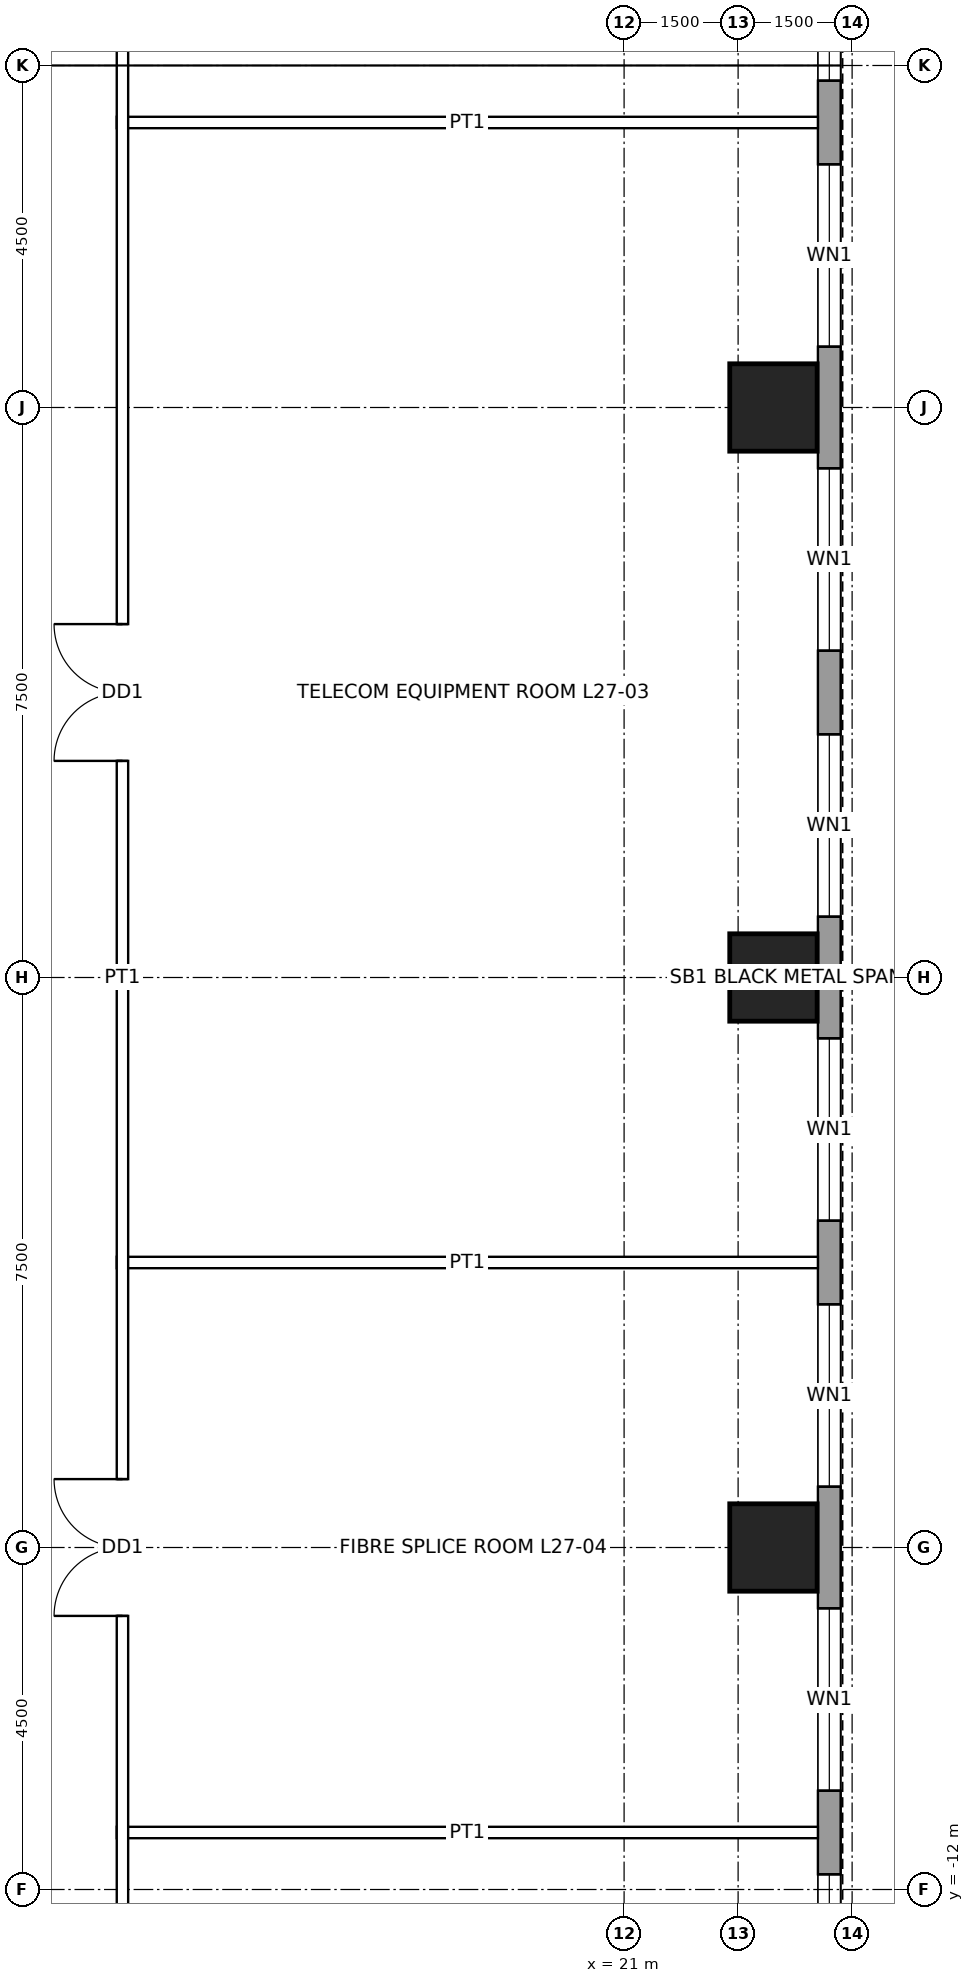
"""IFC4 building model, lengths in metres.
Left out: names, types, materials, properties, quantities, classifications, styles, units other than length and angle.
Written with IfcOpenShell. Run it as: python <this file> out.ifc"""

import sys

from ifc_helpers import new_model, si_unit, direction, frame, frame_2d, origin, origin_2d, place, context, subcontext, project, spatial, rectangle, hollow_rectangle, extrude, element, fill, save


model = new_model("IFC4")
c1 = context("Model", 3, precision=1e-05, world=origin(), true_north=direction((0.0, 1.0)))
c2 = subcontext(c1, "Body", "Model", "MODEL_VIEW")
j1 = project(units=[si_unit("LENGTHUNIT", "METRE"), si_unit("PLANEANGLEUNIT", "RADIAN")], contexts=[c1])
p1 = place(None, origin())
s1 = spatial("IfcSite", under=j1, at=p1, CompositionType="ELEMENT")
p2 = place(p1, origin())
s2 = spatial("IfcBuilding", under=s1, at=p2, CompositionType="ELEMENT")
p3 = place(p2, frame((0.0, 0.0, 135.9)))
s3 = spatial("IfcBuildingStorey", under=s2, at=p3, CompositionType="ELEMENT", Elevation=135.9)
for number, where, z_axis, x_axis in (
    (1, (22.965, 7.5, 0.0), (0.0, 0.0, 1.0), (1.0, 0.0, 0.0)),
    (2, (22.965, 0.0, 0.0), (0.0, 0.0, 1.0), (1.0, 0.0, 0.0)),
    (3, (22.965, -7.5, 0.0), (0.0, 0.0, 1.0), (1.0, 0.0, 0.0)),
):
    element("IfcColumn", number, at=place(p3, frame(where, z_axis=z_axis, x_axis=x_axis)), inside=s3, PredefinedType="COLUMN", context=c2, shape_type="SweptSolid", body=[
        extrude(hollow_rectangle(XDim=1.15, YDim=1.15, WallThickness=0.075, at=origin_2d()), origin(), (0.0, 0.0, 1.0), 4.5),
    ])
p4 = place(p3, frame((23.7, 16.2, 0.0), z_axis=(0.0, 0.0, 1.0), x_axis=(0.0, -1.0, 0.0)))
e4 = element("IfcWall", 4, at=p4, inside=s3, PredefinedType="SOLIDWALL", context=c2, shape_type="SweptSolid", body=[
    extrude(rectangle(XDim=32.4, YDim=0.3, at=frame_2d((16.2, 0.0))), origin(), (0.0, 0.0, 1.0), 4.3),
])
p5 = place(p4, frame((2.0, 0.0, 1.0)))
e5 = element("IfcOpeningElement", 5, at=p5, cuts=e4, PredefinedType="OPENING", context=c2, shape_type="SweptSolid", body=[
    extrude(rectangle(XDim=2.4, YDim=1.2, at=frame_2d((1.2, 0.6))), frame((0.0, 0.16, 0.0), z_axis=(0.0, -1.0, 0.0), x_axis=(1.0, 0.0, 0.0)), (0.0, 0.0, 1.0), 0.32),
])
p6 = place(p4, frame((5.5, 0.0, 1.0)))
e6 = element("IfcOpeningElement", 6, at=p6, cuts=e4, PredefinedType="OPENING", context=c2, shape_type="SweptSolid", body=[
    extrude(rectangle(XDim=2.4, YDim=1.2, at=frame_2d((1.2, 0.6))), frame((0.0, 0.16, 0.0), z_axis=(0.0, -1.0, 0.0), x_axis=(1.0, 0.0, 0.0)), (0.0, 0.0, 1.0), 0.32),
])
p7 = place(p4, frame((9.5, 0.0, 1.0)))
e7 = element("IfcOpeningElement", 7, at=p7, cuts=e4, PredefinedType="OPENING", context=c2, shape_type="SweptSolid", body=[
    extrude(rectangle(XDim=2.4, YDim=1.2, at=frame_2d((1.2, 0.6))), frame((0.0, 0.16, 0.0), z_axis=(0.0, -1.0, 0.0), x_axis=(1.0, 0.0, 0.0)), (0.0, 0.0, 1.0), 0.32),
])
p8 = place(p4, frame((13.0, 0.0, 1.0)))
e8 = element("IfcOpeningElement", 8, at=p8, cuts=e4, PredefinedType="OPENING", context=c2, shape_type="SweptSolid", body=[
    extrude(rectangle(XDim=2.4, YDim=1.2, at=frame_2d((1.2, 0.6))), frame((0.0, 0.16, 0.0), z_axis=(0.0, -1.0, 0.0), x_axis=(1.0, 0.0, 0.0)), (0.0, 0.0, 1.0), 0.32),
])
p9 = place(p4, frame((17.0, 0.0, 1.0)))
e9 = element("IfcOpeningElement", 9, at=p9, cuts=e4, PredefinedType="OPENING", context=c2, shape_type="SweptSolid", body=[
    extrude(rectangle(XDim=2.4, YDim=1.2, at=frame_2d((1.2, 0.6))), frame((0.0, 0.16, 0.0), z_axis=(0.0, -1.0, 0.0), x_axis=(1.0, 0.0, 0.0)), (0.0, 0.0, 1.0), 0.32),
])
p10 = place(p4, frame((20.5, 0.0, 1.0)))
e10 = element("IfcOpeningElement", 10, at=p10, cuts=e4, PredefinedType="OPENING", context=c2, shape_type="SweptSolid", body=[
    extrude(rectangle(XDim=2.4, YDim=1.2, at=frame_2d((1.2, 0.6))), frame((0.0, 0.16, 0.0), z_axis=(0.0, -1.0, 0.0), x_axis=(1.0, 0.0, 0.0)), (0.0, 0.0, 1.0), 0.32),
])
p11 = place(p4, frame((24.5, 0.0, 1.0)))
e11 = element("IfcOpeningElement", 11, at=p11, cuts=e4, PredefinedType="OPENING", context=c2, shape_type="SweptSolid", body=[
    extrude(rectangle(XDim=2.4, YDim=1.2, at=frame_2d((1.2, 0.6))), frame((0.0, 0.16, 0.0), z_axis=(0.0, -1.0, 0.0), x_axis=(1.0, 0.0, 0.0)), (0.0, 0.0, 1.0), 0.32),
])
p12 = place(p4, frame((28.0, 0.0, 1.0)))
e12 = element("IfcOpeningElement", 12, at=p12, cuts=e4, PredefinedType="OPENING", context=c2, shape_type="SweptSolid", body=[
    extrude(rectangle(XDim=2.4, YDim=1.2, at=frame_2d((1.2, 0.6))), frame((0.0, 0.16, 0.0), z_axis=(0.0, -1.0, 0.0), x_axis=(1.0, 0.0, 0.0)), (0.0, 0.0, 1.0), 0.32),
])
for number, where, z_axis, x_axis in (
    (13, (14.325, -11.25, 0.0), (0.0, 0.0, 1.0), (1.0, 0.0, 0.0)),
    (14, (14.325, -3.75, 0.0), (0.0, 0.0, 1.0), (1.0, 0.0, 0.0)),
    (15, (14.325, 11.25, 0.0), (0.0, 0.0, 1.0), (1.0, 0.0, 0.0)),
):
    element("IfcWall", number, at=place(p3, frame(where, z_axis=z_axis, x_axis=x_axis)), inside=s3, PredefinedType="PARTITIONING", context=c2, shape_type="SweptSolid", body=[
        extrude(rectangle(XDim=9.225, YDim=0.15, at=frame_2d((4.613, 0.0))), origin(), (0.0, 0.0, 1.0), 3.431),
    ])
p13 = place(p3, frame((14.4, -14.475, 0.0), z_axis=(0.0, 0.0, 1.0), x_axis=(0.0, 1.0, 0.0)))
e16 = element("IfcWall", 16, at=p13, inside=s3, PredefinedType="PARTITIONING", context=c2, shape_type="SweptSolid", body=[
    extrude(rectangle(XDim=28.95, YDim=0.15, at=frame_2d((14.475, 0.0))), origin(), (0.0, 0.0, 1.0), 4.3),
])
p14 = place(p13, frame((17.325, 0.0, 0.0)))
e17 = element("IfcOpeningElement", 17, at=p14, cuts=e16, PredefinedType="OPENING", context=c2, shape_type="SweptSolid", body=[
    extrude(rectangle(XDim=1.8, YDim=2.4, at=frame_2d((0.9, 1.2))), frame((0.0, 0.085, 0.0), z_axis=(0.0, -1.0, 0.0), x_axis=(1.0, 0.0, 0.0)), (0.0, 0.0, 1.0), 0.17),
])
p15 = place(p13, frame((6.075, 0.0, 0.0)))
e18 = element("IfcOpeningElement", 18, at=p15, cuts=e16, PredefinedType="OPENING", context=c2, shape_type="SweptSolid", body=[
    extrude(rectangle(XDim=1.8, YDim=2.4, at=frame_2d((0.9, 1.2))), frame((0.0, 0.085, 0.0), z_axis=(0.0, -1.0, 0.0), x_axis=(1.0, 0.0, 0.0)), (0.0, 0.0, 1.0), 0.17),
])
p16 = place(p5, origin())
e19 = element("IfcWindow", 19, at=p16, inside=s3, PartitioningType="SINGLE_PANEL", PredefinedType="WINDOW", context=c2, shape_type="SweptSolid", body=[
    extrude(rectangle(XDim=2.4, YDim=1.2, at=frame_2d((1.2, 0.6))), frame((0.0, 0.03, 0.0), z_axis=(0.0, -1.0, 0.0), x_axis=(1.0, 0.0, 0.0)), (0.0, 0.0, 1.0), 0.06),
])
fill(e5, e19)
p17 = place(p6, origin())
e20 = element("IfcWindow", 20, at=p17, inside=s3, PartitioningType="SINGLE_PANEL", PredefinedType="WINDOW", context=c2, shape_type="SweptSolid", body=[
    extrude(rectangle(XDim=2.4, YDim=1.2, at=frame_2d((1.2, 0.6))), frame((0.0, 0.03, 0.0), z_axis=(0.0, -1.0, 0.0), x_axis=(1.0, 0.0, 0.0)), (0.0, 0.0, 1.0), 0.06),
])
fill(e6, e20)
p18 = place(p7, origin())
e21 = element("IfcWindow", 21, at=p18, inside=s3, PartitioningType="SINGLE_PANEL", PredefinedType="WINDOW", context=c2, shape_type="SweptSolid", body=[
    extrude(rectangle(XDim=2.4, YDim=1.2, at=frame_2d((1.2, 0.6))), frame((0.0, 0.03, 0.0), z_axis=(0.0, -1.0, 0.0), x_axis=(1.0, 0.0, 0.0)), (0.0, 0.0, 1.0), 0.06),
])
fill(e7, e21)
p19 = place(p8, origin())
e22 = element("IfcWindow", 22, at=p19, inside=s3, PartitioningType="SINGLE_PANEL", PredefinedType="WINDOW", context=c2, shape_type="SweptSolid", body=[
    extrude(rectangle(XDim=2.4, YDim=1.2, at=frame_2d((1.2, 0.6))), frame((0.0, 0.03, 0.0), z_axis=(0.0, -1.0, 0.0), x_axis=(1.0, 0.0, 0.0)), (0.0, 0.0, 1.0), 0.06),
])
fill(e8, e22)
p20 = place(p9, origin())
e23 = element("IfcWindow", 23, at=p20, inside=s3, PartitioningType="SINGLE_PANEL", PredefinedType="WINDOW", context=c2, shape_type="SweptSolid", body=[
    extrude(rectangle(XDim=2.4, YDim=1.2, at=frame_2d((1.2, 0.6))), frame((0.0, 0.03, 0.0), z_axis=(0.0, -1.0, 0.0), x_axis=(1.0, 0.0, 0.0)), (0.0, 0.0, 1.0), 0.06),
])
fill(e9, e23)
p21 = place(p10, origin())
e24 = element("IfcWindow", 24, at=p21, inside=s3, PartitioningType="SINGLE_PANEL", PredefinedType="WINDOW", context=c2, shape_type="SweptSolid", body=[
    extrude(rectangle(XDim=2.4, YDim=1.2, at=frame_2d((1.2, 0.6))), frame((0.0, 0.03, 0.0), z_axis=(0.0, -1.0, 0.0), x_axis=(1.0, 0.0, 0.0)), (0.0, 0.0, 1.0), 0.06),
])
fill(e10, e24)
p22 = place(p11, origin())
e25 = element("IfcWindow", 25, at=p22, inside=s3, PartitioningType="SINGLE_PANEL", PredefinedType="WINDOW", context=c2, shape_type="SweptSolid", body=[
    extrude(rectangle(XDim=2.4, YDim=1.2, at=frame_2d((1.2, 0.6))), frame((0.0, 0.03, 0.0), z_axis=(0.0, -1.0, 0.0), x_axis=(1.0, 0.0, 0.0)), (0.0, 0.0, 1.0), 0.06),
])
fill(e11, e25)
p23 = place(p12, origin())
e26 = element("IfcWindow", 26, at=p23, inside=s3, PartitioningType="SINGLE_PANEL", PredefinedType="WINDOW", context=c2, shape_type="SweptSolid", body=[
    extrude(rectangle(XDim=2.4, YDim=1.2, at=frame_2d((1.2, 0.6))), frame((0.0, 0.03, 0.0), z_axis=(0.0, -1.0, 0.0), x_axis=(1.0, 0.0, 0.0)), (0.0, 0.0, 1.0), 0.06),
])
fill(e12, e26)
p24 = place(p14, origin())
e27 = element("IfcDoor", 27, at=p24, inside=s3, OperationType="DOUBLE_DOOR_SINGLE_SWING", PredefinedType="DOOR", context=c2, shape_type="SweptSolid", body=[
    extrude(rectangle(XDim=1.8, YDim=2.4, at=frame_2d((0.9, 1.2))), frame((0.0, 0.025, 0.0), z_axis=(0.0, -1.0, 0.0), x_axis=(1.0, 0.0, 0.0)), (0.0, 0.0, 1.0), 0.05),
])
fill(e17, e27)
p25 = place(p15, origin())
e28 = element("IfcDoor", 28, at=p25, inside=s3, OperationType="DOUBLE_DOOR_SINGLE_SWING", PredefinedType="DOOR", context=c2, shape_type="SweptSolid", body=[
    extrude(rectangle(XDim=1.8, YDim=2.4, at=frame_2d((0.9, 1.2))), frame((0.0, 0.025, 0.0), z_axis=(0.0, -1.0, 0.0), x_axis=(1.0, 0.0, 0.0)), (0.0, 0.0, 1.0), 0.05),
])
fill(e18, e28)
save(model, sys.argv[1])
